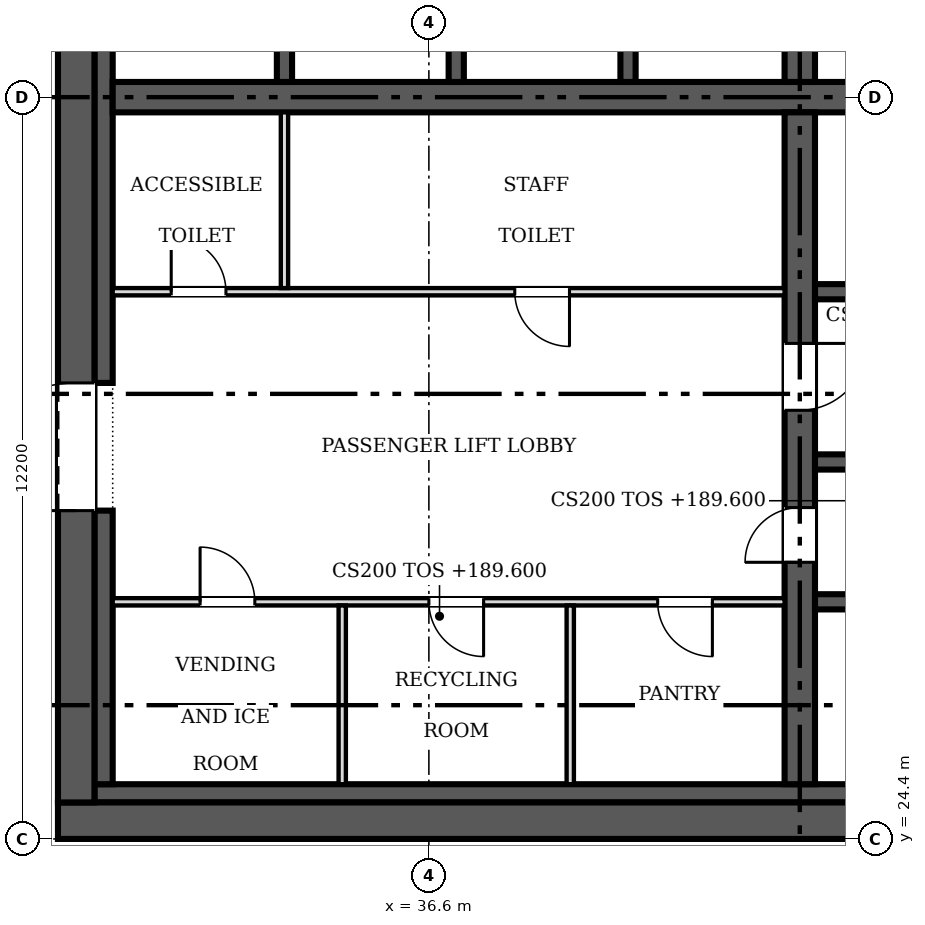
"""IFC4 building model, lengths in metres.
Left out: names, types, materials, properties, quantities, classifications, styles, units other than length and angle.
Written with IfcOpenShell. Run it as: python <this file> out.ifc"""

import sys

from ifc_helpers import new_model, si_unit, direction, frame, frame_2d, origin, place, context, subcontext, project, spatial, rectangle, extrude, source, transform, mapped, element, fill, save


model = new_model("IFC4")
c1 = context("Model", 3, precision=1e-05, world=origin(), true_north=direction((0.0, 1.0)))
c2 = subcontext(c1, "Body", "Model", "MODEL_VIEW")
j1 = project(units=[si_unit("LENGTHUNIT", "METRE"), si_unit("PLANEANGLEUNIT", "RADIAN")], contexts=[c1])
p1 = place(None, origin())
s1 = spatial("IfcSite", under=j1, at=p1, CompositionType="ELEMENT")
p2 = place(p1, origin())
s2 = spatial("IfcBuilding", under=s1, at=p2, CompositionType="ELEMENT")
p3 = place(p2, frame((0.0, 0.0, 189.6)))
s3 = spatial("IfcBuildingStorey", under=s2, at=p3, CompositionType="ELEMENT", Elevation=189.6)
p4 = place(p3, frame((54.9, 24.7, 0.0), z_axis=(0.0, 0.0, 1.0), x_axis=(-1.0, 0.0, 0.0)))
e1 = element("IfcWall", 1, at=p4, inside=s3, PredefinedType="SHEAR", context=c2, shape_type="SweptSolid", body=[
    extrude(rectangle(XDim=24.4, YDim=0.6, at=frame_2d((12.2, 0.0))), origin(), (0.0, 0.0, 1.0), 3.8),
])
m1 = source(origin(), c2, "Body", "SweptSolid", [
    extrude(rectangle(XDim=1.2, YDim=2.1, at=frame_2d((0.6, 1.05))), frame((0.0, 0.31, 0.0), z_axis=(0.0, -1.0, 0.0), x_axis=(1.0, 0.0, 0.0)), (0.0, 0.0, 1.0), 0.62),
])
p5 = place(p4, frame((1.5, 0.0, 0.0)))
e2 = element("IfcOpeningElement", 2, at=p5, cuts=e1, PredefinedType="OPENING", context=c2, shape_type="MappedRepresentation", body=[
    mapped(m1, transform((0.0, 0.0, 0.0), scale=1.0)),
])
p6 = place(p3, frame((30.8, 25.0, 0.0), z_axis=(0.0, 0.0, 1.0), x_axis=(0.0, 1.0, 0.0)))
e3 = element("IfcWall", 3, at=p6, inside=s3, PredefinedType="SHEAR", context=c2, shape_type="SweptSolid", body=[
    extrude(rectangle(XDim=23.2, YDim=0.6, at=frame_2d((11.6, 0.0))), origin(), (0.0, 0.0, 1.0), 3.8),
])
m2 = source(origin(), c2, "Body", "SweptSolid", [
    extrude(rectangle(XDim=2.1, YDim=2.4, at=frame_2d((1.05, 1.2))), frame((0.0, 0.31, 0.0), z_axis=(0.0, -1.0, 0.0), x_axis=(1.0, 0.0, 0.0)), (0.0, 0.0, 1.0), 0.62),
])
p7 = place(p6, frame((4.8, 0.0, 0.0)))
e4 = element("IfcOpeningElement", 4, at=p7, cuts=e3, PredefinedType="OPENING", context=c2, shape_type="MappedRepresentation", body=[
    mapped(m2, transform((0.0, 0.0, 0.0), scale=1.0)),
])
p8 = place(p6, frame((16.3, 0.0, 0.0)))
e5 = element("IfcOpeningElement", 5, at=p8, cuts=e3, PredefinedType="OPENING", context=c2, shape_type="MappedRepresentation", body=[
    mapped(m2, transform((0.0, 0.0, 0.0), scale=1.0)),
])
p9 = place(p3, frame((31.1, 25.15, 0.0), z_axis=(0.0, 0.0, 1.0), x_axis=(1.0, 0.0, 0.0)))
e6 = element("IfcWall", 6, at=p9, inside=s3, PredefinedType="SOLIDWALL", context=c2, shape_type="SweptSolid", body=[
    extrude(rectangle(XDim=21.1, YDim=0.3, at=frame_2d((10.55, 0.0))), origin(), (0.0, 0.0, 1.0), 3.8),
])
p10 = place(p3, frame((31.25, 25.3, 0.0), z_axis=(0.0, 0.0, 1.0), x_axis=(0.0, 1.0, 0.0)))
e7 = element("IfcWall", 7, at=p10, inside=s3, PredefinedType="SOLIDWALL", context=c2, shape_type="SweptSolid", body=[
    extrude(rectangle(XDim=4.5, YDim=0.3, at=frame_2d((2.25, 0.0))), origin(), (0.0, 0.0, 1.0), 3.8),
])
p11 = place(p3, frame((31.25, 31.9, 0.0), z_axis=(0.0, 0.0, 1.0), x_axis=(0.0, 1.0, 0.0)))
e8 = element("IfcWall", 8, at=p11, inside=s3, PredefinedType="SOLIDWALL", context=c2, shape_type="SweptSolid", body=[
    extrude(rectangle(XDim=9.4, YDim=0.3, at=frame_2d((4.7, 0.0))), origin(), (0.0, 0.0, 1.0), 3.8),
])
p12 = place(p3, frame((31.4, 36.6, 0.0), z_axis=(0.0, 0.0, 1.0), x_axis=(1.0, 0.0, 0.0)))
e9 = element("IfcWall", 9, at=p12, inside=s3, PredefinedType="SHEAR", context=c2, shape_type="SweptSolid", body=[
    extrude(rectangle(XDim=16.95, YDim=0.5, at=frame_2d((8.475, 0.0))), origin(), (0.0, 0.0, 1.0), 3.8),
])
p13 = place(p3, frame((42.7, 36.35, 0.0), z_axis=(0.0, 0.0, 1.0), x_axis=(0.0, -1.0, 0.0)))
e10 = element("IfcWall", 10, at=p13, inside=s3, PredefinedType="SHEAR", context=c2, shape_type="SweptSolid", body=[
    extrude(rectangle(XDim=11.05, YDim=0.5, at=frame_2d((5.525, 0.0))), origin(), (0.0, 0.0, 1.0), 3.8),
])
m3 = source(origin(), c2, "Body", "SweptSolid", [
    extrude(rectangle(XDim=0.9, YDim=2.1, at=frame_2d((0.45, 1.05))), frame((0.0, 0.26, 0.0), z_axis=(0.0, -1.0, 0.0), x_axis=(1.0, 0.0, 0.0)), (0.0, 0.0, 1.0), 0.52),
])
p14 = place(p13, frame((6.5, 0.0, 0.0)))
e11 = element("IfcOpeningElement", 11, at=p14, cuts=e10, PredefinedType="OPENING", context=c2, shape_type="MappedRepresentation", body=[
    mapped(m3, transform((0.0, 0.0, 0.0), scale=1.0)),
])
m4 = source(origin(), c2, "Body", "SweptSolid", [
    extrude(rectangle(XDim=1.1, YDim=2.1, at=frame_2d((0.55, 1.05))), frame((0.0, 0.26, 0.0), z_axis=(0.0, -1.0, 0.0), x_axis=(1.0, 0.0, 0.0)), (0.0, 0.0, 1.0), 0.52),
])
p15 = place(p13, frame((3.8, 0.0, 0.0)))
e12 = element("IfcOpeningElement", 12, at=p15, cuts=e10, PredefinedType="OPENING", context=c2, shape_type="MappedRepresentation", body=[
    mapped(m4, transform((0.0, 0.0, 0.0), scale=1.0)),
])
p16 = place(p3, frame((42.7, 36.85, 0.0), z_axis=(0.0, 0.0, 1.0), x_axis=(0.0, 1.0, 0.0)))
e13 = element("IfcWall", 13, at=p16, inside=s3, PredefinedType="SHEAR", context=c2, shape_type="SweptSolid", body=[
    extrude(rectangle(XDim=2.95, YDim=0.5, at=frame_2d((1.475, 0.0))), origin(), (0.0, 0.0, 1.0), 3.8),
])
p17 = place(p3, frame((48.225, 33.4, 0.0), z_axis=(0.0, 0.0, 1.0), x_axis=(-1.0, 0.0, 0.0)))
e14 = element("IfcWall", 14, at=p17, inside=s3, PredefinedType="SOLIDWALL", context=c2, shape_type="SweptSolid", body=[
    extrude(rectangle(XDim=5.275, YDim=0.25, at=frame_2d((2.638, 0.0))), origin(), (0.0, 0.0, 1.0), 3.8),
])
m5 = source(origin(), c2, "Body", "SweptSolid", [
    extrude(rectangle(XDim=1.2, YDim=2.1, at=frame_2d((0.6, 1.05))), frame((0.0, 0.135, 0.0), z_axis=(0.0, -1.0, 0.0), x_axis=(1.0, 0.0, 0.0)), (0.0, 0.0, 1.0), 0.27),
])
p18 = place(p17, frame((3.512, 0.0, 0.0)))
e15 = element("IfcOpeningElement", 15, at=p18, cuts=e14, PredefinedType="OPENING", context=c2, shape_type="MappedRepresentation", body=[
    mapped(m5, transform((0.0, 0.0, 0.0), scale=1.0)),
])
p19 = place(p17, frame((0.688, 0.0, 0.0)))
e16 = element("IfcOpeningElement", 16, at=p19, cuts=e14, PredefinedType="OPENING", context=c2, shape_type="MappedRepresentation", body=[
    mapped(m5, transform((0.0, 0.0, 0.0), scale=1.0)),
])
for number, where, z_axis, x_axis in (
    (17, (42.95, 28.3, 0.0), (0.0, 0.0, 1.0), (1.0, 0.0, 0.0)),
    (18, (42.95, 30.6, 0.0), (0.0, 0.0, 1.0), (1.0, 0.0, 0.0)),
):
    element("IfcWall", number, at=place(p3, frame(where, z_axis=z_axis, x_axis=x_axis)), inside=s3, PredefinedType="SOLIDWALL", context=c2, shape_type="SweptSolid", body=[
        extrude(rectangle(XDim=5.275, YDim=0.25, at=frame_2d((2.638, 0.0))), origin(), (0.0, 0.0, 1.0), 3.8),
    ])
for number, where, z_axis, x_axis in (
    (19, (34.225, 36.85, 0.0), (0.0, 0.0, 1.0), (0.0, 1.0, 0.0)),
    (20, (37.05, 36.85, 0.0), (0.0, 0.0, 1.0), (0.0, 1.0, 0.0)),
    (21, (39.875, 36.85, 0.0), (0.0, 0.0, 1.0), (0.0, 1.0, 0.0)),
):
    element("IfcWall", number, at=place(p3, frame(where, z_axis=z_axis, x_axis=x_axis)), inside=s3, PredefinedType="SOLIDWALL", context=c2, shape_type="SweptSolid", body=[
        extrude(rectangle(XDim=2.825, YDim=0.25, at=frame_2d((1.413, 0.0))), origin(), (0.0, 0.0, 1.0), 3.8),
    ])
p20 = place(p3, frame((42.45, 28.3, 0.0), z_axis=(0.0, 0.0, 1.0), x_axis=(-1.0, 0.0, 0.0)))
e22 = element("IfcWall", 22, at=p20, inside=s3, PredefinedType="PARTITIONING", context=c2, shape_type="SweptSolid", body=[
    extrude(rectangle(XDim=11.05, YDim=0.12, at=frame_2d((5.525, 0.0))), origin(), (0.0, 0.0, 1.0), 3.55),
])
m6 = source(origin(), c2, "Body", "SweptSolid", [
    extrude(rectangle(XDim=0.9, YDim=2.1, at=frame_2d((0.45, 1.05))), frame((0.0, 0.07, 0.0), z_axis=(0.0, -1.0, 0.0), x_axis=(1.0, 0.0, 0.0)), (0.0, 0.0, 1.0), 0.14),
])
p21 = place(p20, frame((8.712, 0.0, 0.0)))
e23 = element("IfcOpeningElement", 23, at=p21, cuts=e22, PredefinedType="OPENING", context=c2, shape_type="MappedRepresentation", body=[
    mapped(m6, transform((0.0, 0.0, 0.0), scale=1.0)),
])
p22 = place(p20, frame((4.95, 0.0, 0.0)))
e24 = element("IfcOpeningElement", 24, at=p22, cuts=e22, PredefinedType="OPENING", context=c2, shape_type="MappedRepresentation", body=[
    mapped(m6, transform((0.0, 0.0, 0.0), scale=1.0)),
])
p23 = place(p20, frame((1.188, 0.0, 0.0)))
e25 = element("IfcOpeningElement", 25, at=p23, cuts=e22, PredefinedType="OPENING", context=c2, shape_type="MappedRepresentation", body=[
    mapped(m6, transform((0.0, 0.0, 0.0), scale=1.0)),
])
p24 = place(p3, frame((31.4, 33.4, 0.0), z_axis=(0.0, 0.0, 1.0), x_axis=(1.0, 0.0, 0.0)))
e26 = element("IfcWall", 26, at=p24, inside=s3, PredefinedType="PARTITIONING", context=c2, shape_type="SweptSolid", body=[
    extrude(rectangle(XDim=11.05, YDim=0.12, at=frame_2d((5.525, 0.0))), origin(), (0.0, 0.0, 1.0), 3.55),
])
p25 = place(p24, frame((0.962, 0.0, 0.0)))
e27 = element("IfcOpeningElement", 27, at=p25, cuts=e26, PredefinedType="OPENING", context=c2, shape_type="MappedRepresentation", body=[
    mapped(m6, transform((0.0, 0.0, 0.0), scale=1.0)),
])
p26 = place(p24, frame((6.613, 0.0, 0.0)))
e28 = element("IfcOpeningElement", 28, at=p26, cuts=e26, PredefinedType="OPENING", context=c2, shape_type="MappedRepresentation", body=[
    mapped(m6, transform((0.0, 0.0, 0.0), scale=1.0)),
])
p27 = place(p3, frame((34.225, 33.46, 0.0), z_axis=(0.0, 0.0, 1.0), x_axis=(0.0, 1.0, 0.0)))
e29 = element("IfcWall", 29, at=p27, inside=s3, PredefinedType="PARTITIONING", context=c2, shape_type="SweptSolid", body=[
    extrude(rectangle(XDim=2.89, YDim=0.12, at=frame_2d((1.445, 0.0))), origin(), (0.0, 0.0, 1.0), 3.55),
])
for number, where, z_axis, x_axis in (
    (30, (35.175, 25.3, 0.0), (0.0, 0.0, 1.0), (0.0, 1.0, 0.0)),
    (31, (38.925, 25.3, 0.0), (0.0, 0.0, 1.0), (0.0, 1.0, 0.0)),
):
    element("IfcWall", number, at=place(p3, frame(where, z_axis=z_axis, x_axis=x_axis)), inside=s3, PredefinedType="PARTITIONING", context=c2, shape_type="SweptSolid", body=[
        extrude(rectangle(XDim=2.94, YDim=0.12, at=frame_2d((1.47, 0.0))), origin(), (0.0, 0.0, 1.0), 3.55),
    ])
m7 = source(origin(), c2, "Body", "SweptSolid", [
    extrude(rectangle(XDim=2.1, YDim=2.4, at=frame_2d((1.05, 1.2))), frame((0.0, 0.025, 0.0), z_axis=(0.0, -1.0, 0.0), x_axis=(1.0, 0.0, 0.0)), (0.0, 0.0, 1.0), 0.05),
])
p28 = place(p7, origin())
e32 = element("IfcDoor", 32, at=p28, inside=s3, OperationType="DOUBLE_DOOR_SINGLE_SWING", PredefinedType="DOOR", context=c2, shape_type="MappedRepresentation", body=[
    mapped(m7, transform((0.0, 0.0, 0.0), scale=1.0)),
])
fill(e4, e32)
m8 = source(origin(), c2, "Body", "SweptSolid", [
    extrude(rectangle(XDim=0.9, YDim=2.1, at=frame_2d((0.45, 1.05))), frame((0.0, 0.025, 0.0), z_axis=(0.0, -1.0, 0.0), x_axis=(1.0, 0.0, 0.0)), (0.0, 0.0, 1.0), 0.05),
])
p29 = place(p14, origin())
e33 = element("IfcDoor", 33, at=p29, inside=s3, OperationType="SINGLE_SWING_RIGHT", PredefinedType="DOOR", context=c2, shape_type="MappedRepresentation", body=[
    mapped(m8, transform((0.0, 0.0, 0.0), scale=1.0)),
])
fill(e11, e33)
m9 = source(origin(), c2, "Body", "SweptSolid", [
    extrude(rectangle(XDim=1.1, YDim=2.1, at=frame_2d((0.55, 1.05))), frame((0.0, 0.025, 0.0), z_axis=(0.0, -1.0, 0.0), x_axis=(1.0, 0.0, 0.0)), (0.0, 0.0, 1.0), 0.05),
])
p30 = place(p15, origin())
e34 = element("IfcDoor", 34, at=p30, inside=s3, OperationType="SINGLE_SWING_LEFT", PredefinedType="DOOR", context=c2, shape_type="MappedRepresentation", body=[
    mapped(m9, transform((0.0, 0.0, 0.0), scale=1.0)),
])
fill(e12, e34)
p31 = place(p21, origin())
e35 = element("IfcDoor", 35, at=p31, inside=s3, OperationType="SINGLE_SWING_RIGHT", PredefinedType="DOOR", context=c2, shape_type="MappedRepresentation", body=[
    mapped(m8, transform((0.0, 0.0, 0.0), scale=1.0)),
])
fill(e23, e35)
p32 = place(p22, origin())
e36 = element("IfcDoor", 36, at=p32, inside=s3, OperationType="SINGLE_SWING_LEFT", PredefinedType="DOOR", context=c2, shape_type="MappedRepresentation", body=[
    mapped(m8, transform((0.0, 0.0, 0.0), scale=1.0)),
])
fill(e24, e36)
p33 = place(p23, origin())
e37 = element("IfcDoor", 37, at=p33, inside=s3, OperationType="SINGLE_SWING_LEFT", PredefinedType="DOOR", context=c2, shape_type="MappedRepresentation", body=[
    mapped(m8, transform((0.0, 0.0, 0.0), scale=1.0)),
])
fill(e25, e37)
p34 = place(p25, origin())
e38 = element("IfcDoor", 38, at=p34, inside=s3, OperationType="SINGLE_SWING_LEFT", PredefinedType="DOOR", context=c2, shape_type="MappedRepresentation", body=[
    mapped(m8, transform((0.0, 0.0, 0.0), scale=1.0)),
])
fill(e27, e38)
p35 = place(p26, origin())
e39 = element("IfcDoor", 39, at=p35, inside=s3, OperationType="SINGLE_SWING_RIGHT", PredefinedType="DOOR", context=c2, shape_type="MappedRepresentation", body=[
    mapped(m8, transform((0.0, 0.0, 0.0), scale=1.0)),
])
fill(e28, e39)
save(model, sys.argv[1])
